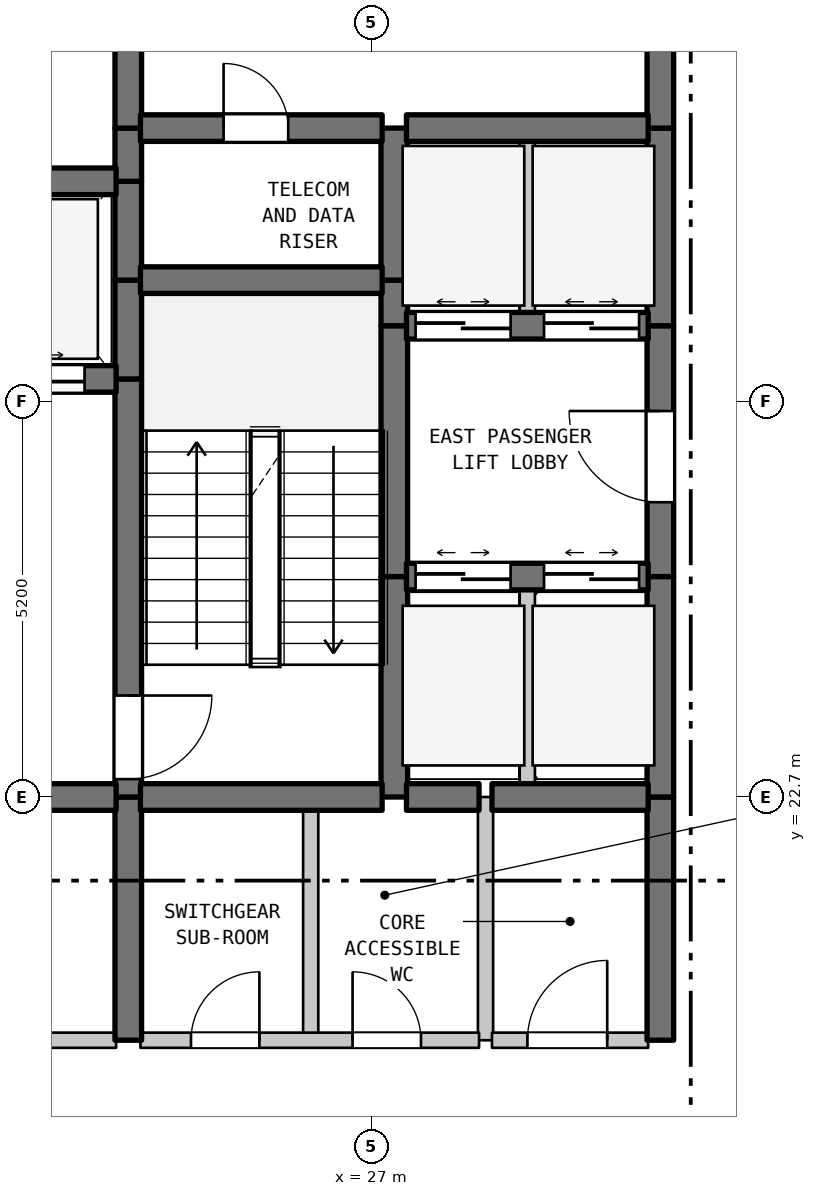
"""IFC4 building model, lengths in metres.
Left out: names, types, materials, properties, quantities, classifications, styles, units other than length and angle.
Written with IfcOpenShell. Run it as: python <this file> out.ifc"""

import sys

from ifc_helpers import new_model, si_unit, direction, frame, frame_2d, origin, place, context, subcontext, project, spatial, rectangle, extrude, element, fill, save


model = new_model("IFC4")
c1 = context("Model", 3, precision=1e-05, world=origin(), true_north=direction((0.0, 1.0)))
c2 = subcontext(c1, "Body", "Model", "MODEL_VIEW")
j1 = project(units=[si_unit("LENGTHUNIT", "METRE"), si_unit("PLANEANGLEUNIT", "RADIAN")], contexts=[c1])
p1 = place(None, origin())
s1 = spatial("IfcSite", under=j1, at=p1, CompositionType="ELEMENT")
p2 = place(p1, origin())
s2 = spatial("IfcBuilding", under=s1, at=p2, CompositionType="ELEMENT")
p3 = place(p2, frame((0.0, 0.0, 86.4)))
s3 = spatial("IfcBuildingStorey", under=s2, at=p3, CompositionType="ELEMENT", Elevation=86.4)
p4 = place(p3, frame((23.8, 19.5, 0.0), z_axis=(0.0, 0.0, 1.0), x_axis=(0.0, 1.0, 0.0)))
e1 = element("IfcWall", 1, at=p4, inside=s3, PredefinedType="SHEAR", context=c2, shape_type="SweptSolid", body=[
    extrude(rectangle(XDim=3.2, YDim=0.35, at=frame_2d((1.6, 0.0))), origin(), (0.0, 0.0, 1.0), 4.185),
])
p5 = place(p3, frame((23.8, 22.7, 0.0), z_axis=(0.0, 0.0, 1.0), x_axis=(0.0, 1.0, 0.0)))
e2 = element("IfcWall", 2, at=p5, inside=s3, PredefinedType="SHEAR", context=c2, shape_type="SweptSolid", body=[
    extrude(rectangle(XDim=5.5, YDim=0.35, at=frame_2d((2.75, 0.0))), origin(), (0.0, 0.0, 1.0), 4.185),
])
p6 = place(p5, frame((0.235, 0.0, 0.0)))
e3 = element("IfcOpeningElement", 3, at=p6, cuts=e2, PredefinedType="OPENING", context=c2, shape_type="SweptSolid", body=[
    extrude(rectangle(XDim=1.1, YDim=2.15, at=frame_2d((0.55, 1.075))), frame((0.0, 0.185, 0.0), z_axis=(0.0, -1.0, 0.0), x_axis=(1.0, 0.0, 0.0)), (0.0, 0.0, 1.0), 0.37),
])
for number, where, z_axis, x_axis in (
    (4, (23.8, 28.2, 0.0), (0.0, 0.0, 1.0), (0.0, 1.0, 0.0)),
    (5, (23.8, 29.5, 0.0), (0.0, 0.0, 1.0), (0.0, 1.0, 0.0)),
):
    element("IfcWall", number, at=place(p3, frame(where, z_axis=z_axis, x_axis=x_axis)), inside=s3, PredefinedType="SHEAR", context=c2, shape_type="SweptSolid", body=[
        extrude(rectangle(XDim=1.3, YDim=0.35, at=frame_2d((0.65, 0.0))), origin(), (0.0, 0.0, 1.0), 4.185),
    ])
p7 = place(p3, frame((23.8, 30.8, 0.0), z_axis=(0.0, 0.0, 1.0), x_axis=(0.0, 1.0, 0.0)))
e6 = element("IfcWall", 6, at=p7, inside=s3, PredefinedType="SHEAR", context=c2, shape_type="SweptSolid", body=[
    extrude(rectangle(XDim=0.7, YDim=0.35, at=frame_2d((0.35, 0.0))), origin(), (0.0, 0.0, 1.0), 4.185),
])
p8 = place(p3, frame((23.8, 31.5, 0.0), z_axis=(0.0, 0.0, 1.0), x_axis=(0.0, 1.0, 0.0)))
e7 = element("IfcWall", 7, at=p8, inside=s3, PredefinedType="SHEAR", context=c2, shape_type="SweptSolid", body=[
    extrude(rectangle(XDim=3.5, YDim=0.35, at=frame_2d((1.75, 0.0))), origin(), (0.0, 0.0, 1.0), 4.185),
])
p9 = place(p8, frame((1.127, 0.0, 0.0)))
e8 = element("IfcOpeningElement", 8, at=p9, cuts=e7, PredefinedType="OPENING", context=c2, shape_type="SweptSolid", body=[
    extrude(rectangle(XDim=1.1, YDim=2.15, at=frame_2d((0.55, 1.075))), frame((0.0, 0.185, 0.0), z_axis=(0.0, -1.0, 0.0), x_axis=(1.0, 0.0, 0.0)), (0.0, 0.0, 1.0), 0.37),
])
p10 = place(p3, frame((26.2, 19.5, 0.0), z_axis=(0.0, 0.0, 1.0), x_axis=(0.0, 1.0, 0.0)))
e9 = element("IfcWall", 9, at=p10, inside=s3, PredefinedType="STANDARD", context=c2, shape_type="SweptSolid", body=[
    extrude(rectangle(XDim=3.2, YDim=0.2, at=frame_2d((1.6, 0.0))), origin(), (0.0, 0.0, 1.0), 4.185),
])
p11 = place(p3, frame((27.3, 22.7, 0.0), z_axis=(0.0, 0.0, 1.0), x_axis=(0.0, 1.0, 0.0)))
e10 = element("IfcWall", 10, at=p11, inside=s3, PredefinedType="SHEAR", context=c2, shape_type="SweptSolid", body=[
    extrude(rectangle(XDim=2.9, YDim=0.35, at=frame_2d((1.45, 0.0))), origin(), (0.0, 0.0, 1.0), 4.185),
])
p12 = place(p3, frame((27.3, 25.6, 0.0), z_axis=(0.0, 0.0, 1.0), x_axis=(0.0, 1.0, 0.0)))
e11 = element("IfcWall", 11, at=p12, inside=s3, PredefinedType="SHEAR", context=c2, shape_type="SweptSolid", body=[
    extrude(rectangle(XDim=3.3, YDim=0.35, at=frame_2d((1.65, 0.0))), origin(), (0.0, 0.0, 1.0), 4.185),
])
p13 = place(p3, frame((27.3, 28.9, 0.0), z_axis=(0.0, 0.0, 1.0), x_axis=(0.0, 1.0, 0.0)))
e12 = element("IfcWall", 12, at=p13, inside=s3, PredefinedType="SHEAR", context=c2, shape_type="SweptSolid", body=[
    extrude(rectangle(XDim=0.6, YDim=0.35, at=frame_2d((0.3, 0.0))), origin(), (0.0, 0.0, 1.0), 4.185),
])
p14 = place(p3, frame((27.3, 29.5, 0.0), z_axis=(0.0, 0.0, 1.0), x_axis=(0.0, 1.0, 0.0)))
e13 = element("IfcWall", 13, at=p14, inside=s3, PredefinedType="SHEAR", context=c2, shape_type="SweptSolid", body=[
    extrude(rectangle(XDim=2.0, YDim=0.35, at=frame_2d((1.0, 0.0))), origin(), (0.0, 0.0, 1.0), 4.185),
])
p15 = place(p3, frame((28.5, 19.5, 0.0), z_axis=(0.0, 0.0, 1.0), x_axis=(0.0, 1.0, 0.0)))
e14 = element("IfcWall", 14, at=p15, inside=s3, PredefinedType="STANDARD", context=c2, shape_type="SweptSolid", body=[
    extrude(rectangle(XDim=3.2, YDim=0.2, at=frame_2d((1.6, 0.0))), origin(), (0.0, 0.0, 1.0), 4.185),
])
p16 = place(p3, frame((29.05, 22.7, 0.0), z_axis=(0.0, 0.0, 1.0), x_axis=(0.0, 1.0, 0.0)))
e15 = element("IfcWall", 15, at=p16, inside=s3, PredefinedType="STANDARD", context=c2, shape_type="SweptSolid", body=[
    extrude(rectangle(XDim=2.9, YDim=0.2, at=frame_2d((1.45, 0.0))), origin(), (0.0, 0.0, 1.0), 4.185),
])
p17 = place(p3, frame((29.05, 28.9, 0.0), z_axis=(0.0, 0.0, 1.0), x_axis=(0.0, 1.0, 0.0)))
e16 = element("IfcWall", 16, at=p17, inside=s3, PredefinedType="STANDARD", context=c2, shape_type="SweptSolid", body=[
    extrude(rectangle(XDim=2.6, YDim=0.2, at=frame_2d((1.3, 0.0))), origin(), (0.0, 0.0, 1.0), 4.185),
])
p18 = place(p3, frame((30.8, 19.5, 0.0), z_axis=(0.0, 0.0, 1.0), x_axis=(0.0, 1.0, 0.0)))
e17 = element("IfcWall", 17, at=p18, inside=s3, PredefinedType="SHEAR", context=c2, shape_type="SweptSolid", body=[
    extrude(rectangle(XDim=3.2, YDim=0.35, at=frame_2d((1.6, 0.0))), origin(), (0.0, 0.0, 1.0), 4.185),
])
p19 = place(p3, frame((30.8, 22.7, 0.0), z_axis=(0.0, 0.0, 1.0), x_axis=(0.0, 1.0, 0.0)))
e18 = element("IfcWall", 18, at=p19, inside=s3, PredefinedType="SHEAR", context=c2, shape_type="SweptSolid", body=[
    extrude(rectangle(XDim=2.9, YDim=0.35, at=frame_2d((1.45, 0.0))), origin(), (0.0, 0.0, 1.0), 4.185),
])
p20 = place(p3, frame((30.8, 25.6, 0.0), z_axis=(0.0, 0.0, 1.0), x_axis=(0.0, 1.0, 0.0)))
e19 = element("IfcWall", 19, at=p20, inside=s3, PredefinedType="SHEAR", context=c2, shape_type="SweptSolid", body=[
    extrude(rectangle(XDim=3.3, YDim=0.35, at=frame_2d((1.65, 0.0))), origin(), (0.0, 0.0, 1.0), 4.185),
])
p21 = place(p20, frame((0.978, 0.0, 0.0)))
e20 = element("IfcOpeningElement", 20, at=p21, cuts=e19, PredefinedType="OPENING", context=c2, shape_type="SweptSolid", body=[
    extrude(rectangle(XDim=1.2, YDim=2.2, at=frame_2d((0.6, 1.1))), frame((0.0, 0.185, 0.0), z_axis=(0.0, -1.0, 0.0), x_axis=(1.0, 0.0, 0.0)), (0.0, 0.0, 1.0), 0.37),
])
p22 = place(p3, frame((30.8, 28.9, 0.0), z_axis=(0.0, 0.0, 1.0), x_axis=(0.0, 1.0, 0.0)))
e21 = element("IfcWall", 21, at=p22, inside=s3, PredefinedType="SHEAR", context=c2, shape_type="SweptSolid", body=[
    extrude(rectangle(XDim=2.6, YDim=0.35, at=frame_2d((1.3, 0.0))), origin(), (0.0, 0.0, 1.0), 4.185),
])
p23 = place(p3, frame((30.8, 31.5, 0.0), z_axis=(0.0, 0.0, 1.0), x_axis=(0.0, 1.0, 0.0)))
e22 = element("IfcWall", 22, at=p23, inside=s3, PredefinedType="SHEAR", context=c2, shape_type="SweptSolid", body=[
    extrude(rectangle(XDim=3.5, YDim=0.35, at=frame_2d((1.75, 0.0))), origin(), (0.0, 0.0, 1.0), 4.185),
])
p24 = place(p23, frame((1.15, 0.0, 0.0)))
e23 = element("IfcOpeningElement", 23, at=p24, cuts=e22, PredefinedType="OPENING", context=c2, shape_type="SweptSolid", body=[
    extrude(rectangle(XDim=1.2, YDim=2.2, at=frame_2d((0.6, 1.1))), frame((0.0, 0.185, 0.0), z_axis=(0.0, -1.0, 0.0), x_axis=(1.0, 0.0, 0.0)), (0.0, 0.0, 1.0), 0.37),
])
p25 = place(p3, frame((19.16, 19.5, 0.0), z_axis=(0.0, 0.0, 1.0), x_axis=(1.0, 0.0, 0.0)))
e24 = element("IfcWall", 24, at=p25, inside=s3, PredefinedType="STANDARD", context=c2, shape_type="SweptSolid", body=[
    extrude(rectangle(XDim=4.48, YDim=0.2, at=frame_2d((2.24, 0.0))), origin(), (0.0, 0.0, 1.0), 4.185),
])
p26 = place(p25, frame((1.64, 0.0, 0.0)))
e25 = element("IfcOpeningElement", 25, at=p26, cuts=e24, PredefinedType="OPENING", context=c2, shape_type="SweptSolid", body=[
    extrude(rectangle(XDim=1.2, YDim=2.2, at=frame_2d((0.6, 1.1))), frame((0.0, 0.11, 0.0), z_axis=(0.0, -1.0, 0.0), x_axis=(1.0, 0.0, 0.0)), (0.0, 0.0, 1.0), 0.22),
])
p27 = place(p3, frame((23.96, 19.5, 0.0), z_axis=(0.0, 0.0, 1.0), x_axis=(1.0, 0.0, 0.0)))
e26 = element("IfcWall", 26, at=p27, inside=s3, PredefinedType="STANDARD", context=c2, shape_type="SweptSolid", body=[
    extrude(rectangle(XDim=4.455, YDim=0.2, at=frame_2d((2.228, 0.0))), origin(), (0.0, 0.0, 1.0), 4.185),
])
p28 = place(p27, frame((0.665, 0.0, 0.0)))
e27 = element("IfcOpeningElement", 27, at=p28, cuts=e26, PredefinedType="OPENING", context=c2, shape_type="SweptSolid", body=[
    extrude(rectangle(XDim=0.9, YDim=2.15, at=frame_2d((0.45, 1.075))), frame((0.0, 0.11, 0.0), z_axis=(0.0, -1.0, 0.0), x_axis=(1.0, 0.0, 0.0)), (0.0, 0.0, 1.0), 0.22),
])
p29 = place(p27, frame((2.791, 0.0, 0.0)))
e28 = element("IfcOpeningElement", 28, at=p29, cuts=e26, PredefinedType="OPENING", context=c2, shape_type="SweptSolid", body=[
    extrude(rectangle(XDim=0.9, YDim=2.15, at=frame_2d((0.45, 1.075))), frame((0.0, 0.11, 0.0), z_axis=(0.0, -1.0, 0.0), x_axis=(1.0, 0.0, 0.0)), (0.0, 0.0, 1.0), 0.22),
])
p30 = place(p3, frame((28.585, 19.5, 0.0), z_axis=(0.0, 0.0, 1.0), x_axis=(1.0, 0.0, 0.0)))
e29 = element("IfcWall", 29, at=p30, inside=s3, PredefinedType="STANDARD", context=c2, shape_type="SweptSolid", body=[
    extrude(rectangle(XDim=2.055, YDim=0.2, at=frame_2d((1.027, 0.0))), origin(), (0.0, 0.0, 1.0), 4.185),
])
p31 = place(p30, frame((0.466, 0.0, 0.0)))
e30 = element("IfcOpeningElement", 30, at=p31, cuts=e29, PredefinedType="OPENING", context=c2, shape_type="SweptSolid", body=[
    extrude(rectangle(XDim=1.05, YDim=2.15, at=frame_2d((0.525, 1.075))), frame((0.0, 0.11, 0.0), z_axis=(0.0, -1.0, 0.0), x_axis=(1.0, 0.0, 0.0)), (0.0, 0.0, 1.0), 0.22),
])
p32 = place(p3, frame((19.16, 22.7, 0.0), z_axis=(0.0, 0.0, 1.0), x_axis=(1.0, 0.0, 0.0)))
e31 = element("IfcWall", 31, at=p32, inside=s3, PredefinedType="SHEAR", context=c2, shape_type="SweptSolid", body=[
    extrude(rectangle(XDim=4.48, YDim=0.35, at=frame_2d((2.24, 0.0))), origin(), (0.0, 0.0, 1.0), 4.185),
])
p33 = place(p32, frame((1.64, 0.0, 0.0)))
e32 = element("IfcOpeningElement", 32, at=p33, cuts=e31, PredefinedType="OPENING", context=c2, shape_type="SweptSolid", body=[
    extrude(rectangle(XDim=1.2, YDim=2.2, at=frame_2d((0.6, 1.1))), frame((0.0, 0.185, 0.0), z_axis=(0.0, -1.0, 0.0), x_axis=(1.0, 0.0, 0.0)), (0.0, 0.0, 1.0), 0.37),
])
p34 = place(p3, frame((23.96, 22.7, 0.0), z_axis=(0.0, 0.0, 1.0), x_axis=(1.0, 0.0, 0.0)))
e33 = element("IfcWall", 33, at=p34, inside=s3, PredefinedType="SHEAR", context=c2, shape_type="SweptSolid", body=[
    extrude(rectangle(XDim=3.18, YDim=0.35, at=frame_2d((1.59, 0.0))), origin(), (0.0, 0.0, 1.0), 4.185),
])
p35 = place(p3, frame((27.46, 22.7, 0.0), z_axis=(0.0, 0.0, 1.0), x_axis=(1.0, 0.0, 0.0)))
e34 = element("IfcWall", 34, at=p35, inside=s3, PredefinedType="SHEAR", context=c2, shape_type="SweptSolid", body=[
    extrude(rectangle(XDim=0.955, YDim=0.35, at=frame_2d((0.478, 0.0))), origin(), (0.0, 0.0, 1.0), 4.185),
])
p36 = place(p3, frame((28.585, 22.7, 0.0), z_axis=(0.0, 0.0, 1.0), x_axis=(1.0, 0.0, 0.0)))
e35 = element("IfcWall", 35, at=p36, inside=s3, PredefinedType="SHEAR", context=c2, shape_type="SweptSolid", body=[
    extrude(rectangle(XDim=2.055, YDim=0.35, at=frame_2d((1.027, 0.0))), origin(), (0.0, 0.0, 1.0), 4.185),
])
p37 = place(p3, frame((27.46, 25.6, 0.0), z_axis=(0.0, 0.0, 1.0), x_axis=(1.0, 0.0, 0.0)))
e36 = element("IfcWall", 36, at=p37, inside=s3, PredefinedType="SHEAR", context=c2, shape_type="SweptSolid", body=[
    extrude(rectangle(XDim=3.18, YDim=0.35, at=frame_2d((1.59, 0.0))), origin(), (0.0, 0.0, 1.0), 4.185),
])
p38 = place(p37, frame((0.12, 0.0, 0.0)))
e37 = element("IfcOpeningElement", 37, at=p38, cuts=e36, PredefinedType="OPENING", context=c2, shape_type="SweptSolid", body=[
    extrude(rectangle(XDim=1.25, YDim=2.2, at=frame_2d((0.625, 1.1))), frame((0.0, 0.185, 0.0), z_axis=(0.0, -1.0, 0.0), x_axis=(1.0, 0.0, 0.0)), (0.0, 0.0, 1.0), 0.37),
])
p39 = place(p37, frame((1.81, 0.0, 0.0)))
e38 = element("IfcOpeningElement", 38, at=p39, cuts=e36, PredefinedType="OPENING", context=c2, shape_type="SweptSolid", body=[
    extrude(rectangle(XDim=1.25, YDim=2.2, at=frame_2d((0.625, 1.1))), frame((0.0, 0.185, 0.0), z_axis=(0.0, -1.0, 0.0), x_axis=(1.0, 0.0, 0.0)), (0.0, 0.0, 1.0), 0.37),
])
p40 = place(p3, frame((19.16, 28.2, 0.0), z_axis=(0.0, 0.0, 1.0), x_axis=(1.0, 0.0, 0.0)))
e39 = element("IfcWall", 39, at=p40, inside=s3, PredefinedType="SHEAR", context=c2, shape_type="SweptSolid", body=[
    extrude(rectangle(XDim=4.48, YDim=0.35, at=frame_2d((2.24, 0.0))), origin(), (0.0, 0.0, 1.0), 4.185),
])
p41 = place(p40, frame((0.415, 0.0, 0.0)))
e40 = element("IfcOpeningElement", 40, at=p41, cuts=e39, PredefinedType="OPENING", context=c2, shape_type="SweptSolid", body=[
    extrude(rectangle(XDim=1.25, YDim=2.2, at=frame_2d((0.625, 1.1))), frame((0.0, 0.185, 0.0), z_axis=(0.0, -1.0, 0.0), x_axis=(1.0, 0.0, 0.0)), (0.0, 0.0, 1.0), 0.37),
])
p42 = place(p40, frame((2.815, 0.0, 0.0)))
e41 = element("IfcOpeningElement", 41, at=p42, cuts=e39, PredefinedType="OPENING", context=c2, shape_type="SweptSolid", body=[
    extrude(rectangle(XDim=1.25, YDim=2.2, at=frame_2d((0.625, 1.1))), frame((0.0, 0.185, 0.0), z_axis=(0.0, -1.0, 0.0), x_axis=(1.0, 0.0, 0.0)), (0.0, 0.0, 1.0), 0.37),
])
p43 = place(p3, frame((27.46, 28.9, 0.0), z_axis=(0.0, 0.0, 1.0), x_axis=(1.0, 0.0, 0.0)))
e42 = element("IfcWall", 42, at=p43, inside=s3, PredefinedType="SHEAR", context=c2, shape_type="SweptSolid", body=[
    extrude(rectangle(XDim=3.18, YDim=0.35, at=frame_2d((1.59, 0.0))), origin(), (0.0, 0.0, 1.0), 4.185),
])
p44 = place(p43, frame((0.12, 0.0, 0.0)))
e43 = element("IfcOpeningElement", 43, at=p44, cuts=e42, PredefinedType="OPENING", context=c2, shape_type="SweptSolid", body=[
    extrude(rectangle(XDim=1.25, YDim=2.2, at=frame_2d((0.625, 1.1))), frame((0.0, 0.185, 0.0), z_axis=(0.0, -1.0, 0.0), x_axis=(1.0, 0.0, 0.0)), (0.0, 0.0, 1.0), 0.37),
])
p45 = place(p43, frame((1.81, 0.0, 0.0)))
e44 = element("IfcOpeningElement", 44, at=p45, cuts=e42, PredefinedType="OPENING", context=c2, shape_type="SweptSolid", body=[
    extrude(rectangle(XDim=1.25, YDim=2.2, at=frame_2d((0.625, 1.1))), frame((0.0, 0.185, 0.0), z_axis=(0.0, -1.0, 0.0), x_axis=(1.0, 0.0, 0.0)), (0.0, 0.0, 1.0), 0.37),
])
p46 = place(p3, frame((23.96, 29.5, 0.0), z_axis=(0.0, 0.0, 1.0), x_axis=(1.0, 0.0, 0.0)))
e45 = element("IfcWall", 45, at=p46, inside=s3, PredefinedType="SHEAR", context=c2, shape_type="SweptSolid", body=[
    extrude(rectangle(XDim=3.18, YDim=0.35, at=frame_2d((1.59, 0.0))), origin(), (0.0, 0.0, 1.0), 4.185),
])
p47 = place(p3, frame((19.16, 30.8, 0.0), z_axis=(0.0, 0.0, 1.0), x_axis=(1.0, 0.0, 0.0)))
e46 = element("IfcWall", 46, at=p47, inside=s3, PredefinedType="SHEAR", context=c2, shape_type="SweptSolid", body=[
    extrude(rectangle(XDim=4.48, YDim=0.35, at=frame_2d((2.24, 0.0))), origin(), (0.0, 0.0, 1.0), 4.185),
])
p48 = place(p3, frame((23.96, 31.5, 0.0), z_axis=(0.0, 0.0, 1.0), x_axis=(1.0, 0.0, 0.0)))
e47 = element("IfcWall", 47, at=p48, inside=s3, PredefinedType="SHEAR", context=c2, shape_type="SweptSolid", body=[
    extrude(rectangle(XDim=3.18, YDim=0.35, at=frame_2d((1.59, 0.0))), origin(), (0.0, 0.0, 1.0), 4.185),
])
p49 = place(p48, frame((1.094, 0.0, 0.0)))
e48 = element("IfcOpeningElement", 48, at=p49, cuts=e47, PredefinedType="OPENING", context=c2, shape_type="SweptSolid", body=[
    extrude(rectangle(XDim=0.85, YDim=2.1, at=frame_2d((0.425, 1.05))), frame((0.0, 0.185, 0.0), z_axis=(0.0, -1.0, 0.0), x_axis=(1.0, 0.0, 0.0)), (0.0, 0.0, 1.0), 0.37),
])
p50 = place(p3, frame((27.46, 31.5, 0.0), z_axis=(0.0, 0.0, 1.0), x_axis=(1.0, 0.0, 0.0)))
e49 = element("IfcWall", 49, at=p50, inside=s3, PredefinedType="SHEAR", context=c2, shape_type="SweptSolid", body=[
    extrude(rectangle(XDim=3.18, YDim=0.35, at=frame_2d((1.59, 0.0))), origin(), (0.0, 0.0, 1.0), 4.185),
])
p51 = place(p6, frame((1.1, 0.0, 0.0), z_axis=(0.0, 0.0, 1.0), x_axis=(-1.0, 0.0, 0.0)))
e50 = element("IfcDoor", 50, at=p51, inside=s3, OperationType="SINGLE_SWING_RIGHT", PredefinedType="DOOR", context=c2, shape_type="SweptSolid", body=[
    extrude(rectangle(XDim=1.1, YDim=2.15, at=frame_2d((0.55, 1.075))), frame((0.0, 0.025, 0.0), z_axis=(0.0, -1.0, 0.0), x_axis=(1.0, 0.0, 0.0)), (0.0, 0.0, 1.0), 0.05),
])
fill(e3, e50)
p52 = place(p21, origin())
e51 = element("IfcDoor", 51, at=p52, inside=s3, OperationType="SINGLE_SWING_RIGHT", PredefinedType="DOOR", context=c2, shape_type="SweptSolid", body=[
    extrude(rectangle(XDim=1.2, YDim=2.2, at=frame_2d((0.6, 1.1))), frame((0.0, 0.025, 0.0), z_axis=(0.0, -1.0, 0.0), x_axis=(1.0, 0.0, 0.0)), (0.0, 0.0, 1.0), 0.05),
])
fill(e20, e51)
p53 = place(p28, origin())
e52 = element("IfcDoor", 52, at=p53, inside=s3, OperationType="SINGLE_SWING_RIGHT", PredefinedType="DOOR", context=c2, shape_type="SweptSolid", body=[
    extrude(rectangle(XDim=0.9, YDim=2.15, at=frame_2d((0.45, 1.075))), frame((0.0, 0.025, 0.0), z_axis=(0.0, -1.0, 0.0), x_axis=(1.0, 0.0, 0.0)), (0.0, 0.0, 1.0), 0.05),
])
fill(e27, e52)
p54 = place(p29, origin())
e53 = element("IfcDoor", 53, at=p54, inside=s3, OperationType="SINGLE_SWING_LEFT", PredefinedType="DOOR", context=c2, shape_type="SweptSolid", body=[
    extrude(rectangle(XDim=0.9, YDim=2.15, at=frame_2d((0.45, 1.075))), frame((0.0, 0.025, 0.0), z_axis=(0.0, -1.0, 0.0), x_axis=(1.0, 0.0, 0.0)), (0.0, 0.0, 1.0), 0.05),
])
fill(e28, e53)
p55 = place(p31, origin())
e54 = element("IfcDoor", 54, at=p55, inside=s3, OperationType="SINGLE_SWING_RIGHT", PredefinedType="DOOR", context=c2, shape_type="SweptSolid", body=[
    extrude(rectangle(XDim=1.05, YDim=2.15, at=frame_2d((0.525, 1.075))), frame((0.0, 0.025, 0.0), z_axis=(0.0, -1.0, 0.0), x_axis=(1.0, 0.0, 0.0)), (0.0, 0.0, 1.0), 0.05),
])
fill(e30, e54)
p56 = place(p38, origin())
e55 = element("IfcDoor", 55, at=p56, inside=s3, OperationType="DOUBLE_DOOR_SLIDING", PredefinedType="DOOR", context=c2, shape_type="SweptSolid", body=[
    extrude(rectangle(XDim=1.25, YDim=2.2, at=frame_2d((0.625, 1.1))), frame((0.0, 0.025, 0.0), z_axis=(0.0, -1.0, 0.0), x_axis=(1.0, 0.0, 0.0)), (0.0, 0.0, 1.0), 0.05),
])
fill(e37, e55)
p57 = place(p39, origin())
e56 = element("IfcDoor", 56, at=p57, inside=s3, OperationType="DOUBLE_DOOR_SLIDING", PredefinedType="DOOR", context=c2, shape_type="SweptSolid", body=[
    extrude(rectangle(XDim=1.25, YDim=2.2, at=frame_2d((0.625, 1.1))), frame((0.0, 0.025, 0.0), z_axis=(0.0, -1.0, 0.0), x_axis=(1.0, 0.0, 0.0)), (0.0, 0.0, 1.0), 0.05),
])
fill(e38, e56)
p58 = place(p42, origin())
e57 = element("IfcDoor", 57, at=p58, inside=s3, OperationType="DOUBLE_DOOR_SLIDING", PredefinedType="DOOR", context=c2, shape_type="SweptSolid", body=[
    extrude(rectangle(XDim=1.25, YDim=2.2, at=frame_2d((0.625, 1.1))), frame((0.0, 0.025, 0.0), z_axis=(0.0, -1.0, 0.0), x_axis=(1.0, 0.0, 0.0)), (0.0, 0.0, 1.0), 0.05),
])
fill(e41, e57)
p59 = place(p44, origin())
e58 = element("IfcDoor", 58, at=p59, inside=s3, OperationType="DOUBLE_DOOR_SLIDING", PredefinedType="DOOR", context=c2, shape_type="SweptSolid", body=[
    extrude(rectangle(XDim=1.25, YDim=2.2, at=frame_2d((0.625, 1.1))), frame((0.0, 0.025, 0.0), z_axis=(0.0, -1.0, 0.0), x_axis=(1.0, 0.0, 0.0)), (0.0, 0.0, 1.0), 0.05),
])
fill(e43, e58)
p60 = place(p45, origin())
e59 = element("IfcDoor", 59, at=p60, inside=s3, OperationType="DOUBLE_DOOR_SLIDING", PredefinedType="DOOR", context=c2, shape_type="SweptSolid", body=[
    extrude(rectangle(XDim=1.25, YDim=2.2, at=frame_2d((0.625, 1.1))), frame((0.0, 0.025, 0.0), z_axis=(0.0, -1.0, 0.0), x_axis=(1.0, 0.0, 0.0)), (0.0, 0.0, 1.0), 0.05),
])
fill(e44, e59)
p61 = place(p49, origin())
e60 = element("IfcDoor", 60, at=p61, inside=s3, OperationType="SINGLE_SWING_LEFT", PredefinedType="DOOR", context=c2, shape_type="SweptSolid", body=[
    extrude(rectangle(XDim=0.85, YDim=2.1, at=frame_2d((0.425, 1.05))), frame((0.0, 0.025, 0.0), z_axis=(0.0, -1.0, 0.0), x_axis=(1.0, 0.0, 0.0)), (0.0, 0.0, 1.0), 0.05),
])
fill(e48, e60)
save(model, sys.argv[1])
